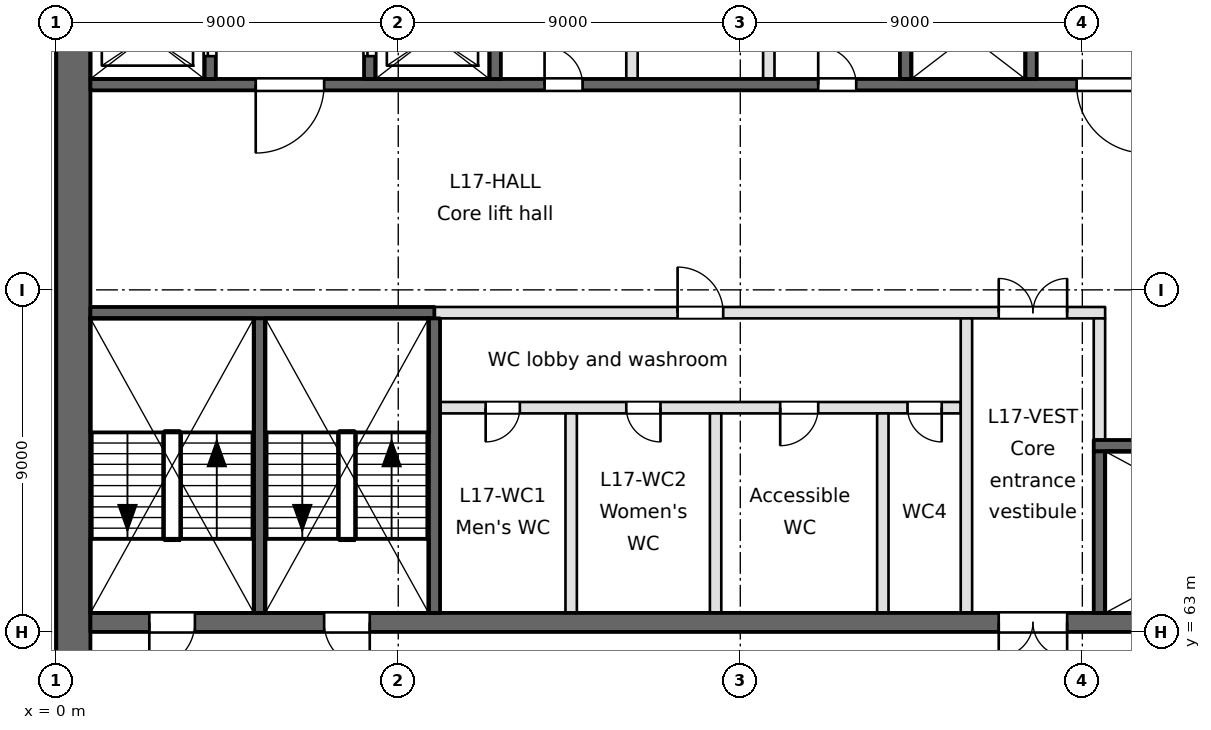
"""IFC4 building model, lengths in metres.
Left out: names, types, materials, properties, quantities, classifications, styles, units other than length and angle.
Written with IfcOpenShell. Run it as: python <this file> out.ifc"""

import sys

from ifc_helpers import new_model, si_unit, direction, frame, frame_2d, origin, place, context, subcontext, project, spatial, rectangle, extrude, element, fill, save


model = new_model("IFC4")
c1 = context("Model", 3, precision=1e-05, world=origin(), true_north=direction((0.0, 1.0)))
c2 = subcontext(c1, "Body", "Model", "MODEL_VIEW")
j1 = project(units=[si_unit("LENGTHUNIT", "METRE"), si_unit("PLANEANGLEUNIT", "RADIAN")], contexts=[c1])
p1 = place(None, origin())
s1 = spatial("IfcSite", under=j1, at=p1, CompositionType="ELEMENT")
p2 = place(p1, origin())
s2 = spatial("IfcBuilding", under=s1, at=p2, CompositionType="ELEMENT")
p3 = place(p2, frame((0.0, 0.0, 72.8)))
s3 = spatial("IfcBuildingStorey", under=s2, at=p3, CompositionType="ELEMENT", Elevation=72.8)
p4 = place(p3, frame((0.45, 94.5, 0.0), z_axis=(0.0, 0.0, 1.0), x_axis=(0.0, -1.0, 0.0)))
e1 = element("IfcWall", 1, at=p4, inside=s3, PredefinedType="SHEAR", context=c2, shape_type="SweptSolid", body=[
    extrude(rectangle(XDim=66.187, YDim=0.9, at=frame_2d((33.094, 0.0))), origin(), (0.0, 0.0, 1.0), 3.7),
])
p5 = place(p3, frame((0.9, 63.25, -0.4), z_axis=(0.0, 0.0, 1.0), x_axis=(1.0, 0.0, 0.0)))
e2 = element("IfcWall", 2, at=p5, inside=s3, PredefinedType="SOLIDWALL", context=c2, shape_type="SweptSolid", body=[
    extrude(rectangle(XDim=35.1, YDim=0.5, at=frame_2d((17.55, 0.0))), origin(), (0.0, 0.0, 1.0), 3.7),
])
p6 = place(p5, frame((23.9, 0.0, 0.4)))
e3 = element("IfcOpeningElement", 3, at=p6, cuts=e2, PredefinedType="OPENING", context=c2, shape_type="SweptSolid", body=[
    extrude(rectangle(XDim=1.8, YDim=2.1, at=frame_2d((0.9, 1.05))), frame((0.0, 0.25, 0.0), z_axis=(0.0, -1.0, 0.0), x_axis=(1.0, 0.0, 0.0)), (0.0, 0.0, 1.0), 0.5),
])
p7 = place(p5, frame((1.55, 0.0, 0.4)))
e4 = element("IfcOpeningElement", 4, at=p7, cuts=e2, PredefinedType="OPENING", context=c2, shape_type="SweptSolid", body=[
    extrude(rectangle(XDim=1.2, YDim=2.1, at=frame_2d((0.6, 1.05))), frame((0.0, 0.25, 0.0), z_axis=(0.0, -1.0, 0.0), x_axis=(1.0, 0.0, 0.0)), (0.0, 0.0, 1.0), 0.5),
])
p8 = place(p5, frame((6.15, 0.0, 0.4)))
e5 = element("IfcOpeningElement", 5, at=p8, cuts=e2, PredefinedType="OPENING", context=c2, shape_type="SweptSolid", body=[
    extrude(rectangle(XDim=1.2, YDim=2.1, at=frame_2d((0.6, 1.05))), frame((0.0, 0.25, 0.0), z_axis=(0.0, -1.0, 0.0), x_axis=(1.0, 0.0, 0.0)), (0.0, 0.0, 1.0), 0.5),
])
p9 = place(p3, frame((27.3, 67.9, -0.4), z_axis=(0.0, 0.0, 1.0), x_axis=(1.0, 0.0, 0.0)))
e6 = element("IfcWall", 6, at=p9, inside=s3, PredefinedType="SOLIDWALL", context=c2, shape_type="SweptSolid", body=[
    extrude(rectangle(XDim=8.2, YDim=0.3, at=frame_2d((4.1, 0.0))), origin(), (0.0, 0.0, 1.0), 3.7),
])
p10 = place(p3, frame((10.1, 68.9, 0.0), z_axis=(0.0, 0.0, 1.0), x_axis=(1.0, 0.0, 0.0)))
e7 = element("IfcWall", 7, at=p10, inside=s3, PredefinedType="PARTITIONING", context=c2, shape_type="SweptSolid", body=[
    extrude(rectangle(XDim=13.7, YDim=0.3, at=frame_2d((6.85, 0.0))), origin(), (0.0, 0.0, 1.0), 3.3),
])
p11 = place(p10, frame((1.2, 0.0, 0.0)))
e8 = element("IfcOpeningElement", 8, at=p11, cuts=e7, PredefinedType="OPENING", context=c2, shape_type="SweptSolid", body=[
    extrude(rectangle(XDim=0.9, YDim=2.1, at=frame_2d((0.45, 1.05))), frame((0.0, 0.15, 0.0), z_axis=(0.0, -1.0, 0.0), x_axis=(1.0, 0.0, 0.0)), (0.0, 0.0, 1.0), 0.3),
])
p12 = place(p10, frame((4.9, 0.0, 0.0)))
e9 = element("IfcOpeningElement", 9, at=p12, cuts=e7, PredefinedType="OPENING", context=c2, shape_type="SweptSolid", body=[
    extrude(rectangle(XDim=0.9, YDim=2.1, at=frame_2d((0.45, 1.05))), frame((0.0, 0.15, 0.0), z_axis=(0.0, -1.0, 0.0), x_axis=(1.0, 0.0, 0.0)), (0.0, 0.0, 1.0), 0.3),
])
p13 = place(p10, frame((8.95, 0.0, 0.0)))
e10 = element("IfcOpeningElement", 10, at=p13, cuts=e7, PredefinedType="OPENING", context=c2, shape_type="SweptSolid", body=[
    extrude(rectangle(XDim=1.0, YDim=2.1, at=frame_2d((0.5, 1.05))), frame((0.0, 0.15, 0.0), z_axis=(0.0, -1.0, 0.0), x_axis=(1.0, 0.0, 0.0)), (0.0, 0.0, 1.0), 0.3),
])
p14 = place(p10, frame((12.3, 0.0, 0.0)))
e11 = element("IfcOpeningElement", 11, at=p14, cuts=e7, PredefinedType="OPENING", context=c2, shape_type="SweptSolid", body=[
    extrude(rectangle(XDim=0.9, YDim=2.1, at=frame_2d((0.45, 1.05))), frame((0.0, 0.15, 0.0), z_axis=(0.0, -1.0, 0.0), x_axis=(1.0, 0.0, 0.0)), (0.0, 0.0, 1.0), 0.3),
])
p15 = place(p3, frame((0.9, 71.4, -0.4), z_axis=(0.0, 0.0, 1.0), x_axis=(1.0, 0.0, 0.0)))
e12 = element("IfcWall", 12, at=p15, inside=s3, PredefinedType="SOLIDWALL", context=c2, shape_type="SweptSolid", body=[
    extrude(rectangle(XDim=9.05, YDim=0.3, at=frame_2d((4.525, 0.0))), origin(), (0.0, 0.0, 1.0), 3.7),
])
p16 = place(p3, frame((9.95, 71.4, 0.0), z_axis=(0.0, 0.0, 1.0), x_axis=(1.0, 0.0, 0.0)))
e13 = element("IfcWall", 13, at=p16, inside=s3, PredefinedType="PARTITIONING", context=c2, shape_type="SweptSolid", body=[
    extrude(rectangle(XDim=17.65, YDim=0.3, at=frame_2d((8.825, 0.0))), origin(), (0.0, 0.0, 1.0), 3.3),
])
p17 = place(p16, frame((14.85, 0.0, 0.0)))
e14 = element("IfcOpeningElement", 14, at=p17, cuts=e13, PredefinedType="OPENING", context=c2, shape_type="SweptSolid", body=[
    extrude(rectangle(XDim=1.8, YDim=2.1, at=frame_2d((0.9, 1.05))), frame((0.0, 0.15, 0.0), z_axis=(0.0, -1.0, 0.0), x_axis=(1.0, 0.0, 0.0)), (0.0, 0.0, 1.0), 0.3),
])
p18 = place(p16, frame((6.4, 0.0, 0.0)))
e15 = element("IfcOpeningElement", 15, at=p18, cuts=e13, PredefinedType="OPENING", context=c2, shape_type="SweptSolid", body=[
    extrude(rectangle(XDim=1.2, YDim=2.1, at=frame_2d((0.6, 1.05))), frame((0.0, 0.15, 0.0), z_axis=(0.0, -1.0, 0.0), x_axis=(1.0, 0.0, 0.0)), (0.0, 0.0, 1.0), 0.3),
])
p19 = place(p3, frame((0.9, 77.4, -0.4), z_axis=(0.0, 0.0, 1.0), x_axis=(1.0, 0.0, 0.0)))
e16 = element("IfcWall", 16, at=p19, inside=s3, PredefinedType="SOLIDWALL", context=c2, shape_type="SweptSolid", body=[
    extrude(rectangle(XDim=28.95, YDim=0.3, at=frame_2d((14.475, 0.0))), origin(), (0.0, 0.0, 1.0), 3.7),
])
p20 = place(p19, frame((4.35, 0.0, 0.4)))
e17 = element("IfcOpeningElement", 17, at=p20, cuts=e16, PredefinedType="OPENING", context=c2, shape_type="SweptSolid", body=[
    extrude(rectangle(XDim=1.8, YDim=2.1, at=frame_2d((0.9, 1.05))), frame((0.0, 0.15, 0.0), z_axis=(0.0, -1.0, 0.0), x_axis=(1.0, 0.0, 0.0)), (0.0, 0.0, 1.0), 0.3),
])
p21 = place(p19, frame((25.95, 0.0, 0.4)))
e18 = element("IfcOpeningElement", 18, at=p21, cuts=e16, PredefinedType="OPENING", context=c2, shape_type="SweptSolid", body=[
    extrude(rectangle(XDim=1.8, YDim=2.1, at=frame_2d((0.9, 1.05))), frame((0.0, 0.15, 0.0), z_axis=(0.0, -1.0, 0.0), x_axis=(1.0, 0.0, 0.0)), (0.0, 0.0, 1.0), 0.3),
])
p22 = place(p19, frame((11.95, 0.0, 0.4)))
e19 = element("IfcOpeningElement", 19, at=p22, cuts=e16, PredefinedType="OPENING", context=c2, shape_type="SweptSolid", body=[
    extrude(rectangle(XDim=1.0, YDim=2.1, at=frame_2d((0.5, 1.05))), frame((0.0, 0.15, 0.0), z_axis=(0.0, -1.0, 0.0), x_axis=(1.0, 0.0, 0.0)), (0.0, 0.0, 1.0), 0.3),
])
p23 = place(p19, frame((19.15, 0.0, 0.4)))
e20 = element("IfcOpeningElement", 20, at=p23, cuts=e16, PredefinedType="OPENING", context=c2, shape_type="SweptSolid", body=[
    extrude(rectangle(XDim=1.0, YDim=2.1, at=frame_2d((0.5, 1.05))), frame((0.0, 0.15, 0.0), z_axis=(0.0, -1.0, 0.0), x_axis=(1.0, 0.0, 0.0)), (0.0, 0.0, 1.0), 0.3),
])
p24 = place(p3, frame((4.05, 77.55, -0.4), z_axis=(0.0, 0.0, 1.0), x_axis=(0.0, 1.0, 0.0)))
e21 = element("IfcWall", 21, at=p24, inside=s3, PredefinedType="SOLIDWALL", context=c2, shape_type="SweptSolid", body=[
    extrude(rectangle(XDim=10.1, YDim=0.3, at=frame_2d((5.05, 0.0))), origin(), (0.0, 0.0, 1.0), 3.7),
])
p25 = place(p24, frame((0.6, 0.0, 0.4)))
e22 = element("IfcOpeningElement", 22, at=p25, cuts=e21, PredefinedType="OPENING", context=c2, shape_type="SweptSolid", body=[
    extrude(rectangle(XDim=1.1, YDim=2.1, at=frame_2d((0.55, 1.05))), frame((0.0, 0.15, 0.0), z_axis=(0.0, -1.0, 0.0), x_axis=(1.0, 0.0, 0.0)), (0.0, 0.0, 1.0), 0.3),
])
p26 = place(p24, frame((3.2, 0.0, 0.4)))
e23 = element("IfcOpeningElement", 23, at=p26, cuts=e21, PredefinedType="OPENING", context=c2, shape_type="SweptSolid", body=[
    extrude(rectangle(XDim=1.1, YDim=2.1, at=frame_2d((0.55, 1.05))), frame((0.0, 0.15, 0.0), z_axis=(0.0, -1.0, 0.0), x_axis=(1.0, 0.0, 0.0)), (0.0, 0.0, 1.0), 0.3),
])
p27 = place(p24, frame((5.8, 0.0, 0.4)))
e24 = element("IfcOpeningElement", 24, at=p27, cuts=e21, PredefinedType="OPENING", context=c2, shape_type="SweptSolid", body=[
    extrude(rectangle(XDim=1.1, YDim=2.1, at=frame_2d((0.55, 1.05))), frame((0.0, 0.15, 0.0), z_axis=(0.0, -1.0, 0.0), x_axis=(1.0, 0.0, 0.0)), (0.0, 0.0, 1.0), 0.3),
])
p28 = place(p24, frame((8.4, 0.0, 0.4)))
e25 = element("IfcOpeningElement", 25, at=p28, cuts=e21, PredefinedType="OPENING", context=c2, shape_type="SweptSolid", body=[
    extrude(rectangle(XDim=1.1, YDim=2.1, at=frame_2d((0.55, 1.05))), frame((0.0, 0.15, 0.0), z_axis=(0.0, -1.0, 0.0), x_axis=(1.0, 0.0, 0.0)), (0.0, 0.0, 1.0), 0.3),
])
p29 = place(p3, frame((5.35, 63.5, -0.4), z_axis=(0.0, 0.0, 1.0), x_axis=(0.0, 1.0, 0.0)))
e26 = element("IfcWall", 26, at=p29, inside=s3, PredefinedType="SOLIDWALL", context=c2, shape_type="SweptSolid", body=[
    extrude(rectangle(XDim=7.75, YDim=0.3, at=frame_2d((3.875, 0.0))), origin(), (0.0, 0.0, 1.0), 3.7),
])
p30 = place(p3, frame((8.25, 77.55, -0.4), z_axis=(0.0, 0.0, 1.0), x_axis=(0.0, 1.0, 0.0)))
e27 = element("IfcWall", 27, at=p30, inside=s3, PredefinedType="SOLIDWALL", context=c2, shape_type="SweptSolid", body=[
    extrude(rectangle(XDim=10.1, YDim=0.3, at=frame_2d((5.05, 0.0))), origin(), (0.0, 0.0, 1.0), 3.7),
])
p31 = place(p30, frame((0.6, 0.0, 0.4)))
e28 = element("IfcOpeningElement", 28, at=p31, cuts=e27, PredefinedType="OPENING", context=c2, shape_type="SweptSolid", body=[
    extrude(rectangle(XDim=1.1, YDim=2.1, at=frame_2d((0.55, 1.05))), frame((0.0, 0.15, 0.0), z_axis=(0.0, -1.0, 0.0), x_axis=(1.0, 0.0, 0.0)), (0.0, 0.0, 1.0), 0.3),
])
p32 = place(p30, frame((3.2, 0.0, 0.4)))
e29 = element("IfcOpeningElement", 29, at=p32, cuts=e27, PredefinedType="OPENING", context=c2, shape_type="SweptSolid", body=[
    extrude(rectangle(XDim=1.1, YDim=2.1, at=frame_2d((0.55, 1.05))), frame((0.0, 0.15, 0.0), z_axis=(0.0, -1.0, 0.0), x_axis=(1.0, 0.0, 0.0)), (0.0, 0.0, 1.0), 0.3),
])
p33 = place(p30, frame((5.8, 0.0, 0.4)))
e30 = element("IfcOpeningElement", 30, at=p33, cuts=e27, PredefinedType="OPENING", context=c2, shape_type="SweptSolid", body=[
    extrude(rectangle(XDim=1.1, YDim=2.1, at=frame_2d((0.55, 1.05))), frame((0.0, 0.15, 0.0), z_axis=(0.0, -1.0, 0.0), x_axis=(1.0, 0.0, 0.0)), (0.0, 0.0, 1.0), 0.3),
])
p34 = place(p30, frame((8.4, 0.0, 0.4)))
e31 = element("IfcOpeningElement", 31, at=p34, cuts=e27, PredefinedType="OPENING", context=c2, shape_type="SweptSolid", body=[
    extrude(rectangle(XDim=1.1, YDim=2.1, at=frame_2d((0.55, 1.05))), frame((0.0, 0.15, 0.0), z_axis=(0.0, -1.0, 0.0), x_axis=(1.0, 0.0, 0.0)), (0.0, 0.0, 1.0), 0.3),
])
p35 = place(p3, frame((9.95, 63.5, -0.4), z_axis=(0.0, 0.0, 1.0), x_axis=(0.0, 1.0, 0.0)))
e32 = element("IfcWall", 32, at=p35, inside=s3, PredefinedType="SOLIDWALL", context=c2, shape_type="SweptSolid", body=[
    extrude(rectangle(XDim=7.75, YDim=0.3, at=frame_2d((3.875, 0.0))), origin(), (0.0, 0.0, 1.0), 3.7),
])
p36 = place(p3, frame((11.55, 77.55, -0.4), z_axis=(0.0, 0.0, 1.0), x_axis=(0.0, 1.0, 0.0)))
e33 = element("IfcWall", 33, at=p36, inside=s3, PredefinedType="SOLIDWALL", context=c2, shape_type="SweptSolid", body=[
    extrude(rectangle(XDim=10.1, YDim=0.3, at=frame_2d((5.05, 0.0))), origin(), (0.0, 0.0, 1.0), 3.7),
])
p37 = place(p3, frame((13.55, 63.5, 0.0), z_axis=(0.0, 0.0, 1.0), x_axis=(0.0, 1.0, 0.0)))
e34 = element("IfcWall", 34, at=p37, inside=s3, PredefinedType="PARTITIONING", context=c2, shape_type="SweptSolid", body=[
    extrude(rectangle(XDim=5.25, YDim=0.3, at=frame_2d((2.625, 0.0))), origin(), (0.0, 0.0, 1.0), 3.3),
])
p38 = place(p3, frame((15.15, 77.55, 0.0), z_axis=(0.0, 0.0, 1.0), x_axis=(0.0, 1.0, 0.0)))
e35 = element("IfcWall", 35, at=p38, inside=s3, PredefinedType="PARTITIONING", context=c2, shape_type="SweptSolid", body=[
    extrude(rectangle(XDim=12.95, YDim=0.3, at=frame_2d((6.475, 0.0))), origin(), (0.0, 0.0, 1.0), 3.3),
])
p39 = place(p3, frame((17.35, 63.5, 0.0), z_axis=(0.0, 0.0, 1.0), x_axis=(0.0, 1.0, 0.0)))
e36 = element("IfcWall", 36, at=p39, inside=s3, PredefinedType="PARTITIONING", context=c2, shape_type="SweptSolid", body=[
    extrude(rectangle(XDim=5.25, YDim=0.3, at=frame_2d((2.625, 0.0))), origin(), (0.0, 0.0, 1.0), 3.3),
])
p40 = place(p3, frame((18.75, 77.55, 0.0), z_axis=(0.0, 0.0, 1.0), x_axis=(0.0, 1.0, 0.0)))
e37 = element("IfcWall", 37, at=p40, inside=s3, PredefinedType="PARTITIONING", context=c2, shape_type="SweptSolid", body=[
    extrude(rectangle(XDim=12.95, YDim=0.3, at=frame_2d((6.475, 0.0))), origin(), (0.0, 0.0, 1.0), 3.3),
])
p41 = place(p3, frame((21.75, 63.5, 0.0), z_axis=(0.0, 0.0, 1.0), x_axis=(0.0, 1.0, 0.0)))
e38 = element("IfcWall", 38, at=p41, inside=s3, PredefinedType="PARTITIONING", context=c2, shape_type="SweptSolid", body=[
    extrude(rectangle(XDim=5.25, YDim=0.3, at=frame_2d((2.625, 0.0))), origin(), (0.0, 0.0, 1.0), 3.3),
])
p42 = place(p3, frame((22.35, 77.55, -0.4), z_axis=(0.0, 0.0, 1.0), x_axis=(0.0, 1.0, 0.0)))
e39 = element("IfcWall", 39, at=p42, inside=s3, PredefinedType="SOLIDWALL", context=c2, shape_type="SweptSolid", body=[
    extrude(rectangle(XDim=10.1, YDim=0.3, at=frame_2d((5.05, 0.0))), origin(), (0.0, 0.0, 1.0), 3.7),
])
p43 = place(p3, frame((23.95, 63.5, 0.0), z_axis=(0.0, 0.0, 1.0), x_axis=(0.0, 1.0, 0.0)))
e40 = element("IfcWall", 40, at=p43, inside=s3, PredefinedType="PARTITIONING", context=c2, shape_type="SweptSolid", body=[
    extrude(rectangle(XDim=7.75, YDim=0.3, at=frame_2d((3.875, 0.0))), origin(), (0.0, 0.0, 1.0), 3.3),
])
p44 = place(p3, frame((25.65, 77.55, -0.4), z_axis=(0.0, 0.0, 1.0), x_axis=(0.0, 1.0, 0.0)))
e41 = element("IfcWall", 41, at=p44, inside=s3, PredefinedType="SOLIDWALL", context=c2, shape_type="SweptSolid", body=[
    extrude(rectangle(XDim=10.1, YDim=0.3, at=frame_2d((5.05, 0.0))), origin(), (0.0, 0.0, 1.0), 3.7),
])
p45 = place(p3, frame((27.45, 63.5, -0.4), z_axis=(0.0, 0.0, 1.0), x_axis=(0.0, 1.0, 0.0)))
e42 = element("IfcWall", 42, at=p45, inside=s3, PredefinedType="SOLIDWALL", context=c2, shape_type="SweptSolid", body=[
    extrude(rectangle(XDim=4.25, YDim=0.3, at=frame_2d((2.125, 0.0))), origin(), (0.0, 0.0, 1.0), 3.7),
])
p46 = place(p3, frame((27.45, 68.05, 0.0), z_axis=(0.0, 0.0, 1.0), x_axis=(0.0, 1.0, 0.0)))
e43 = element("IfcWall", 43, at=p46, inside=s3, PredefinedType="PARTITIONING", context=c2, shape_type="SweptSolid", body=[
    extrude(rectangle(XDim=3.2, YDim=0.3, at=frame_2d((1.6, 0.0))), origin(), (0.0, 0.0, 1.0), 3.3),
])
p47 = place(p25, origin())
e44 = element("IfcDoor", 44, at=p47, inside=s3, OperationType="SLIDING_TO_RIGHT", PredefinedType="DOOR", context=c2, shape_type="SweptSolid", body=[
    extrude(rectangle(XDim=1.1, YDim=2.1, at=frame_2d((0.55, 1.05))), frame((0.0, 0.025, 0.0), z_axis=(0.0, -1.0, 0.0), x_axis=(1.0, 0.0, 0.0)), (0.0, 0.0, 1.0), 0.05),
])
fill(e22, e44)
p48 = place(p31, origin())
e45 = element("IfcDoor", 45, at=p48, inside=s3, OperationType="SLIDING_TO_RIGHT", PredefinedType="DOOR", context=c2, shape_type="SweptSolid", body=[
    extrude(rectangle(XDim=1.1, YDim=2.1, at=frame_2d((0.55, 1.05))), frame((0.0, 0.025, 0.0), z_axis=(0.0, -1.0, 0.0), x_axis=(1.0, 0.0, 0.0)), (0.0, 0.0, 1.0), 0.05),
])
fill(e28, e45)
p49 = place(p20, frame((1.8, 0.0, 0.0), z_axis=(0.0, 0.0, 1.0), x_axis=(-1.0, 0.0, 0.0)))
e46 = element("IfcDoor", 46, at=p49, inside=s3, OperationType="SINGLE_SWING_RIGHT", PredefinedType="DOOR", context=c2, shape_type="SweptSolid", body=[
    extrude(rectangle(XDim=1.8, YDim=2.1, at=frame_2d((0.9, 1.05))), frame((0.0, 0.025, 0.0), z_axis=(0.0, -1.0, 0.0), x_axis=(1.0, 0.0, 0.0)), (0.0, 0.0, 1.0), 0.05),
])
fill(e17, e46)
p50 = place(p21, frame((1.8, 0.0, 0.0), z_axis=(0.0, 0.0, 1.0), x_axis=(-1.0, 0.0, 0.0)))
e47 = element("IfcDoor", 47, at=p50, inside=s3, OperationType="SINGLE_SWING_LEFT", PredefinedType="DOOR", context=c2, shape_type="SweptSolid", body=[
    extrude(rectangle(XDim=1.8, YDim=2.1, at=frame_2d((0.9, 1.05))), frame((0.0, 0.025, 0.0), z_axis=(0.0, -1.0, 0.0), x_axis=(1.0, 0.0, 0.0)), (0.0, 0.0, 1.0), 0.05),
])
fill(e18, e47)
p51 = place(p6, frame((1.8, 0.0, 0.0), z_axis=(0.0, 0.0, 1.0), x_axis=(-1.0, 0.0, 0.0)))
e48 = element("IfcDoor", 48, at=p51, inside=s3, OperationType="DOUBLE_DOOR_SINGLE_SWING", PredefinedType="DOOR", context=c2, shape_type="SweptSolid", body=[
    extrude(rectangle(XDim=1.8, YDim=2.1, at=frame_2d((0.9, 1.05))), frame((0.0, 0.025, 0.0), z_axis=(0.0, -1.0, 0.0), x_axis=(1.0, 0.0, 0.0)), (0.0, 0.0, 1.0), 0.05),
])
fill(e3, e48)
p52 = place(p17, origin())
e49 = element("IfcDoor", 49, at=p52, inside=s3, OperationType="DOUBLE_DOOR_SINGLE_SWING", PredefinedType="DOOR", context=c2, shape_type="SweptSolid", body=[
    extrude(rectangle(XDim=1.8, YDim=2.1, at=frame_2d((0.9, 1.05))), frame((0.0, 0.025, 0.0), z_axis=(0.0, -1.0, 0.0), x_axis=(1.0, 0.0, 0.0)), (0.0, 0.0, 1.0), 0.05),
])
fill(e14, e49)
p53 = place(p11, frame((0.9, 0.0, 0.0), z_axis=(0.0, 0.0, 1.0), x_axis=(-1.0, 0.0, 0.0)))
e50 = element("IfcDoor", 50, at=p53, inside=s3, OperationType="SINGLE_SWING_RIGHT", PredefinedType="DOOR", context=c2, shape_type="SweptSolid", body=[
    extrude(rectangle(XDim=0.9, YDim=2.1, at=frame_2d((0.45, 1.05))), frame((0.0, 0.025, 0.0), z_axis=(0.0, -1.0, 0.0), x_axis=(1.0, 0.0, 0.0)), (0.0, 0.0, 1.0), 0.05),
])
fill(e8, e50)
p54 = place(p12, frame((0.9, 0.0, 0.0), z_axis=(0.0, 0.0, 1.0), x_axis=(-1.0, 0.0, 0.0)))
e51 = element("IfcDoor", 51, at=p54, inside=s3, OperationType="SINGLE_SWING_LEFT", PredefinedType="DOOR", context=c2, shape_type="SweptSolid", body=[
    extrude(rectangle(XDim=0.9, YDim=2.1, at=frame_2d((0.45, 1.05))), frame((0.0, 0.025, 0.0), z_axis=(0.0, -1.0, 0.0), x_axis=(1.0, 0.0, 0.0)), (0.0, 0.0, 1.0), 0.05),
])
fill(e9, e51)
p55 = place(p13, frame((1.0, 0.0, 0.0), z_axis=(0.0, 0.0, 1.0), x_axis=(-1.0, 0.0, 0.0)))
e52 = element("IfcDoor", 52, at=p55, inside=s3, OperationType="SINGLE_SWING_RIGHT", PredefinedType="DOOR", context=c2, shape_type="SweptSolid", body=[
    extrude(rectangle(XDim=1.0, YDim=2.1, at=frame_2d((0.5, 1.05))), frame((0.0, 0.025, 0.0), z_axis=(0.0, -1.0, 0.0), x_axis=(1.0, 0.0, 0.0)), (0.0, 0.0, 1.0), 0.05),
])
fill(e10, e52)
p56 = place(p14, frame((0.9, 0.0, 0.0), z_axis=(0.0, 0.0, 1.0), x_axis=(-1.0, 0.0, 0.0)))
e53 = element("IfcDoor", 53, at=p56, inside=s3, OperationType="SINGLE_SWING_LEFT", PredefinedType="DOOR", context=c2, shape_type="SweptSolid", body=[
    extrude(rectangle(XDim=0.9, YDim=2.1, at=frame_2d((0.45, 1.05))), frame((0.0, 0.025, 0.0), z_axis=(0.0, -1.0, 0.0), x_axis=(1.0, 0.0, 0.0)), (0.0, 0.0, 1.0), 0.05),
])
fill(e11, e53)
p57 = place(p18, origin())
e54 = element("IfcDoor", 54, at=p57, inside=s3, OperationType="SINGLE_SWING_LEFT", PredefinedType="DOOR", context=c2, shape_type="SweptSolid", body=[
    extrude(rectangle(XDim=1.2, YDim=2.1, at=frame_2d((0.6, 1.05))), frame((0.0, 0.025, 0.0), z_axis=(0.0, -1.0, 0.0), x_axis=(1.0, 0.0, 0.0)), (0.0, 0.0, 1.0), 0.05),
])
fill(e15, e54)
p58 = place(p7, frame((1.2, 0.0, 0.0), z_axis=(0.0, 0.0, 1.0), x_axis=(-1.0, 0.0, 0.0)))
e55 = element("IfcDoor", 55, at=p58, inside=s3, OperationType="SINGLE_SWING_RIGHT", PredefinedType="DOOR", context=c2, shape_type="SweptSolid", body=[
    extrude(rectangle(XDim=1.2, YDim=2.1, at=frame_2d((0.6, 1.05))), frame((0.0, 0.025, 0.0), z_axis=(0.0, -1.0, 0.0), x_axis=(1.0, 0.0, 0.0)), (0.0, 0.0, 1.0), 0.05),
])
fill(e4, e55)
p59 = place(p8, frame((1.2, 0.0, 0.0), z_axis=(0.0, 0.0, 1.0), x_axis=(-1.0, 0.0, 0.0)))
e56 = element("IfcDoor", 56, at=p59, inside=s3, OperationType="SINGLE_SWING_LEFT", PredefinedType="DOOR", context=c2, shape_type="SweptSolid", body=[
    extrude(rectangle(XDim=1.2, YDim=2.1, at=frame_2d((0.6, 1.05))), frame((0.0, 0.025, 0.0), z_axis=(0.0, -1.0, 0.0), x_axis=(1.0, 0.0, 0.0)), (0.0, 0.0, 1.0), 0.05),
])
fill(e5, e56)
p60 = place(p22, origin())
e57 = element("IfcDoor", 57, at=p60, inside=s3, OperationType="SINGLE_SWING_LEFT", PredefinedType="DOOR", context=c2, shape_type="SweptSolid", body=[
    extrude(rectangle(XDim=1.0, YDim=2.1, at=frame_2d((0.5, 1.05))), frame((0.0, 0.025, 0.0), z_axis=(0.0, -1.0, 0.0), x_axis=(1.0, 0.0, 0.0)), (0.0, 0.0, 1.0), 0.05),
])
fill(e19, e57)
p61 = place(p23, origin())
e58 = element("IfcDoor", 58, at=p61, inside=s3, OperationType="SINGLE_SWING_LEFT", PredefinedType="DOOR", context=c2, shape_type="SweptSolid", body=[
    extrude(rectangle(XDim=1.0, YDim=2.1, at=frame_2d((0.5, 1.05))), frame((0.0, 0.025, 0.0), z_axis=(0.0, -1.0, 0.0), x_axis=(1.0, 0.0, 0.0)), (0.0, 0.0, 1.0), 0.05),
])
fill(e20, e58)
save(model, sys.argv[1])
